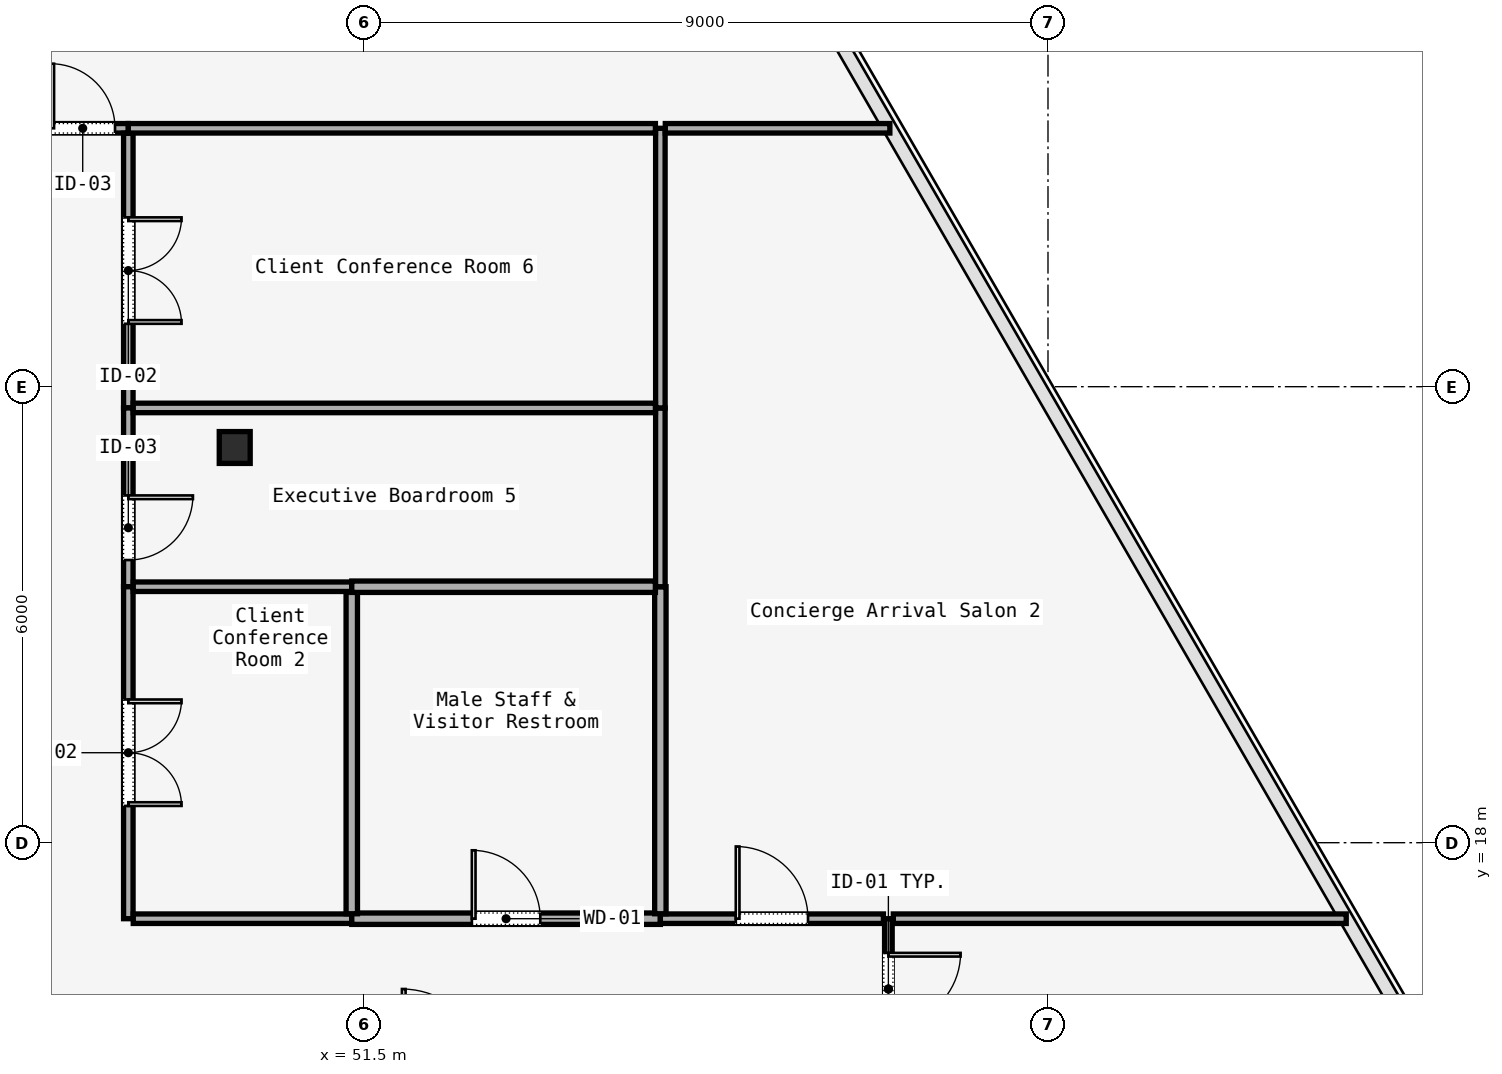
"""IFC4 building model, lengths in metres.
Left out: names, types, materials, properties, quantities, classifications, styles, units other than length and angle.
Written with IfcOpenShell. Run it as: python <this file> out.ifc"""

import sys

from ifc_helpers import new_model, si_unit, direction, frame, frame_2d, origin, origin_2d, place, context, subcontext, project, spatial, rectangle, i_section, extrude, element, fill, save


model = new_model("IFC4")
c1 = context("Model", 3, precision=1e-05, world=origin(), true_north=direction((0.0, 1.0)))
c2 = subcontext(c1, "Body", "Model", "MODEL_VIEW")
j1 = project(units=[si_unit("LENGTHUNIT", "METRE"), si_unit("PLANEANGLEUNIT", "RADIAN")], contexts=[c1])
p1 = place(None, origin())
s1 = spatial("IfcSite", under=j1, at=p1, CompositionType="ELEMENT")
p2 = place(p1, origin())
s2 = spatial("IfcBuilding", under=s1, at=p2, CompositionType="ELEMENT")
p3 = place(p2, frame((0.0, 0.0, 157.4)))
s3 = spatial("IfcBuildingStorey", under=s2, at=p3, CompositionType="ELEMENT", Elevation=157.4)
p4 = place(p3, frame((49.8, 23.2, 0.0), z_axis=(0.0, 0.0, 1.0), x_axis=(1.0, 0.0, 0.0)))
e1 = element("IfcColumn", 1, at=p4, inside=s3, PredefinedType="COLUMN", context=c2, shape_type="SweptSolid", body=[
    extrude(i_section(OverallWidth=0.407, OverallDepth=0.419, WebThickness=0.031, FlangeThickness=0.049, FilletRadius=0.015, at=origin_2d()), origin(), (0.0, 0.0, 1.0), 3.58),
])
p5 = place(p3, frame((58.4, 17.0, 0.0), z_axis=(0.0, 0.0, 1.0), x_axis=(0.0, -1.0, 0.0)))
e2 = element("IfcWall", 2, at=p5, inside=s3, PredefinedType="MOVABLE", context=c2, shape_type="SweptSolid", body=[
    extrude(rectangle(XDim=1.85, YDim=0.1, at=frame_2d((0.925, 0.0))), origin(), (0.0, 0.0, 1.0), 3.01),
])
p6 = place(p5, frame((0.45, 0.0, 0.0)))
e3 = element("IfcOpeningElement", 3, at=p6, cuts=e2, PredefinedType="OPENING", context=c2, shape_type="SweptSolid", body=[
    extrude(rectangle(XDim=0.95, YDim=2.2, at=frame_2d((0.475, 1.1))), frame((0.0, 0.05, 0.0), z_axis=(0.0, -1.0, 0.0), x_axis=(1.0, 0.0, 0.0)), (0.0, 0.0, 1.0), 0.1),
])
p7 = place(p3, frame((47.2, 27.4, 0.0), z_axis=(0.0, 0.0, 1.0), x_axis=(1.0, 0.0, 0.0)))
e4 = element("IfcWall", 4, at=p7, inside=s3, PredefinedType="PARTITIONING", context=c2, shape_type="SweptSolid", body=[
    extrude(rectangle(XDim=1.2, YDim=0.125, at=frame_2d((0.6, 0.0))), origin(), (0.0, 0.0, 1.0), 3.01),
])
p8 = place(p7, frame((0.175, 0.0, 0.0)))
e5 = element("IfcOpeningElement", 5, at=p8, cuts=e4, PredefinedType="OPENING", context=c2, shape_type="SweptSolid", body=[
    extrude(rectangle(XDim=0.85, YDim=2.15, at=frame_2d((0.425, 1.075))), frame((0.0, 0.062, 0.0), z_axis=(0.0, -1.0, 0.0), x_axis=(1.0, 0.0, 0.0)), (0.0, 0.0, 1.0), 0.125),
])
p9 = place(p3, frame((48.4, 27.335, 0.0), z_axis=(0.0, 0.0, 1.0), x_axis=(0.0, -1.0, 0.0)))
e6 = element("IfcWall", 6, at=p9, inside=s3, PredefinedType="PARTITIONING", context=c2, shape_type="SweptSolid", body=[
    extrude(rectangle(XDim=3.615, YDim=0.125, at=frame_2d((1.807, 0.0))), origin(), (0.0, 0.0, 1.0), 3.01),
])
p10 = place(p9, frame((1.107, 0.0, 0.0)))
e7 = element("IfcOpeningElement", 7, at=p10, cuts=e6, PredefinedType="OPENING", context=c2, shape_type="SweptSolid", body=[
    extrude(rectangle(XDim=1.4, YDim=2.2, at=frame_2d((0.7, 1.1))), frame((0.0, 0.062, 0.0), z_axis=(0.0, -1.0, 0.0), x_axis=(1.0, 0.0, 0.0)), (0.0, 0.0, 1.0), 0.125),
])
p11 = place(p3, frame((48.4, 23.72, 0.0), z_axis=(0.0, 0.0, 1.0), x_axis=(0.0, -1.0, 0.0)))
e8 = element("IfcWall", 8, at=p11, inside=s3, PredefinedType="PARTITIONING", context=c2, shape_type="SweptSolid", body=[
    extrude(rectangle(XDim=2.353, YDim=0.125, at=frame_2d((1.176, 0.0))), origin(), (0.0, 0.0, 1.0), 3.01),
])
p12 = place(p11, frame((1.151, 0.0, 0.0)))
e9 = element("IfcOpeningElement", 9, at=p12, cuts=e8, PredefinedType="OPENING", context=c2, shape_type="SweptSolid", body=[
    extrude(rectangle(XDim=0.85, YDim=2.15, at=frame_2d((0.425, 1.075))), frame((0.0, 0.062, 0.0), z_axis=(0.0, -1.0, 0.0), x_axis=(1.0, 0.0, 0.0)), (0.0, 0.0, 1.0), 0.125),
])
p13 = place(p3, frame((48.4, 21.368, 0.0), z_axis=(0.0, 0.0, 1.0), x_axis=(0.0, -1.0, 0.0)))
e10 = element("IfcWall", 10, at=p13, inside=s3, PredefinedType="PARTITIONING", context=c2, shape_type="SweptSolid", body=[
    extrude(rectangle(XDim=4.368, YDim=0.125, at=frame_2d((2.184, 0.0))), origin(), (0.0, 0.0, 1.0), 3.01),
])
p14 = place(p13, frame((1.484, 0.0, 0.0)))
e11 = element("IfcOpeningElement", 11, at=p14, cuts=e10, PredefinedType="OPENING", context=c2, shape_type="SweptSolid", body=[
    extrude(rectangle(XDim=1.4, YDim=2.2, at=frame_2d((0.7, 1.1))), frame((0.0, 0.062, 0.0), z_axis=(0.0, -1.0, 0.0), x_axis=(1.0, 0.0, 0.0)), (0.0, 0.0, 1.0), 0.125),
])
p15 = place(p3, frame((48.465, 17.0, 0.0), z_axis=(0.0, 0.0, 1.0), x_axis=(1.0, 0.0, 0.0)))
e12 = element("IfcWall", 12, at=p15, inside=s3, PredefinedType="PARTITIONING", context=c2, shape_type="SweptSolid", body=[
    extrude(rectangle(XDim=2.875, YDim=0.125, at=frame_2d((1.438, 0.0))), origin(), (0.0, 0.0, 1.0), 3.01),
])
p16 = place(p3, frame((51.34, 17.0, 0.0), z_axis=(0.0, 0.0, 1.0), x_axis=(1.0, 0.0, 0.0)))
e13 = element("IfcWall", 13, at=p16, inside=s3, PredefinedType="PARTITIONING", context=c2, shape_type="SweptSolid", body=[
    extrude(rectangle(XDim=4.06, YDim=0.15, at=frame_2d((2.03, 0.0))), origin(), (0.0, 0.0, 1.0), 3.01),
])
p17 = place(p16, frame((1.58, 0.0, 0.0)))
e14 = element("IfcOpeningElement", 14, at=p17, cuts=e13, PredefinedType="OPENING", context=c2, shape_type="SweptSolid", body=[
    extrude(rectangle(XDim=0.9, YDim=2.15, at=frame_2d((0.45, 1.075))), frame((0.0, 0.075, 0.0), z_axis=(0.0, -1.0, 0.0), x_axis=(1.0, 0.0, 0.0)), (0.0, 0.0, 1.0), 0.15),
])
p18 = place(p3, frame((55.4, 17.0, 0.0), z_axis=(0.0, 0.0, 1.0), x_axis=(1.0, 0.0, 0.0)))
e15 = element("IfcWall", 15, at=p18, inside=s3, PredefinedType="PARTITIONING", context=c2, shape_type="SweptSolid", body=[
    extrude(rectangle(XDim=2.935, YDim=0.125, at=frame_2d((1.468, 0.0))), origin(), (0.0, 0.0, 1.0), 3.01),
])
p19 = place(p18, frame((0.992, 0.0, 0.0)))
e16 = element("IfcOpeningElement", 16, at=p19, cuts=e15, PredefinedType="OPENING", context=c2, shape_type="SweptSolid", body=[
    extrude(rectangle(XDim=0.95, YDim=2.2, at=frame_2d((0.475, 1.1))), frame((0.0, 0.062, 0.0), z_axis=(0.0, -1.0, 0.0), x_axis=(1.0, 0.0, 0.0)), (0.0, 0.0, 1.0), 0.125),
])
p20 = place(p3, frame((58.465, 17.0, 0.0), z_axis=(0.0, 0.0, 1.0), x_axis=(1.0, 0.0, 0.0)))
e17 = element("IfcWall", 17, at=p20, inside=s3, PredefinedType="PARTITIONING", context=c2, shape_type="SweptSolid", body=[
    extrude(rectangle(XDim=5.959, YDim=0.125, at=frame_2d((2.979, 0.0))), origin(), (0.0, 0.0, 1.0), 3.01),
])
p21 = place(p3, frame((48.465, 21.368, 0.0), z_axis=(0.0, 0.0, 1.0), x_axis=(1.0, 0.0, 0.0)))
e18 = element("IfcWall", 18, at=p21, inside=s3, PredefinedType="PARTITIONING", context=c2, shape_type="SweptSolid", body=[
    extrude(rectangle(XDim=2.875, YDim=0.125, at=frame_2d((1.438, 0.0))), origin(), (0.0, 0.0, 1.0), 3.01),
])
p22 = place(p3, frame((51.34, 21.303, 0.0), z_axis=(0.0, 0.0, 1.0), x_axis=(0.0, -1.0, 0.0)))
e19 = element("IfcWall", 19, at=p22, inside=s3, PredefinedType="PARTITIONING", context=c2, shape_type="SweptSolid", body=[
    extrude(rectangle(XDim=4.238, YDim=0.15, at=frame_2d((2.119, 0.0))), origin(), (0.0, 0.0, 1.0), 3.01),
])
p23 = place(p3, frame((55.4, 21.368, 0.0), z_axis=(0.0, 0.0, 1.0), x_axis=(0.0, -1.0, 0.0)))
e20 = element("IfcWall", 20, at=p23, inside=s3, PredefinedType="PARTITIONING", context=c2, shape_type="SweptSolid", body=[
    extrude(rectangle(XDim=4.303, YDim=0.15, at=frame_2d((2.151, 0.0))), origin(), (0.0, 0.0, 1.0), 3.01),
])
p24 = place(p3, frame((51.34, 21.368, 0.0), z_axis=(0.0, 0.0, 1.0), x_axis=(1.0, 0.0, 0.0)))
e21 = element("IfcWall", 21, at=p24, inside=s3, PredefinedType="PARTITIONING", context=c2, shape_type="SweptSolid", body=[
    extrude(rectangle(XDim=3.995, YDim=0.15, at=frame_2d((1.998, 0.0))), origin(), (0.0, 0.0, 1.0), 3.01),
])
p25 = place(p3, frame((55.4, 21.368, 0.0), z_axis=(0.0, 0.0, 1.0), x_axis=(0.0, 1.0, 0.0)))
e22 = element("IfcWall", 22, at=p25, inside=s3, PredefinedType="PARTITIONING", context=c2, shape_type="SweptSolid", body=[
    extrude(rectangle(XDim=2.353, YDim=0.125, at=frame_2d((1.176, 0.0))), origin(), (0.0, 0.0, 1.0), 3.01),
])
p26 = place(p3, frame((55.4, 23.72, 0.0), z_axis=(0.0, 0.0, 1.0), x_axis=(0.0, 1.0, 0.0)))
e23 = element("IfcWall", 23, at=p26, inside=s3, PredefinedType="PARTITIONING", context=c2, shape_type="SweptSolid", body=[
    extrude(rectangle(XDim=3.679, YDim=0.125, at=frame_2d((1.84, 0.0))), origin(), (0.0, 0.0, 1.0), 3.01),
])
p27 = place(p3, frame((55.465, 27.4, 0.0), z_axis=(0.0, 0.0, 1.0), x_axis=(1.0, 0.0, 0.0)))
e24 = element("IfcWall", 24, at=p27, inside=s3, PredefinedType="PARTITIONING", context=c2, shape_type="SweptSolid", body=[
    extrude(rectangle(XDim=2.954, YDim=0.125, at=frame_2d((1.477, 0.0))), origin(), (0.0, 0.0, 1.0), 3.01),
])
p28 = place(p3, frame((48.465, 23.72, 0.0), z_axis=(0.0, 0.0, 1.0), x_axis=(1.0, 0.0, 0.0)))
e25 = element("IfcWall", 25, at=p28, inside=s3, PredefinedType="PARTITIONING", context=c2, shape_type="SweptSolid", body=[
    extrude(rectangle(XDim=6.87, YDim=0.125, at=frame_2d((3.435, 0.0))), origin(), (0.0, 0.0, 1.0), 3.01),
])
p29 = place(p3, frame((48.4, 27.4, 0.0), z_axis=(0.0, 0.0, 1.0), x_axis=(1.0, 0.0, 0.0)))
e26 = element("IfcWall", 26, at=p29, inside=s3, PredefinedType="PARTITIONING", context=c2, shape_type="SweptSolid", body=[
    extrude(rectangle(XDim=6.935, YDim=0.125, at=frame_2d((3.468, 0.0))), origin(), (0.0, 0.0, 1.0), 3.01),
])
p30 = place(p6, origin())
e27 = element("IfcDoor", 27, at=p30, inside=s3, OperationType="SINGLE_SWING_LEFT", PredefinedType="DOOR", context=c2, shape_type="SweptSolid", body=[
    extrude(rectangle(XDim=0.95, YDim=2.2, at=frame_2d((0.475, 1.1))), frame((0.0, 0.025, 0.0), z_axis=(0.0, -1.0, 0.0), x_axis=(1.0, 0.0, 0.0)), (0.0, 0.0, 1.0), 0.05),
])
fill(e3, e27)
p31 = place(p14, origin())
e28 = element("IfcDoor", 28, at=p31, inside=s3, OperationType="SINGLE_SWING_RIGHT", PredefinedType="DOOR", context=c2, shape_type="SweptSolid", body=[
    extrude(rectangle(XDim=1.4, YDim=2.2, at=frame_2d((0.7, 1.1))), frame((0.0, 0.025, 0.0), z_axis=(0.0, -1.0, 0.0), x_axis=(1.0, 0.0, 0.0)), (0.0, 0.0, 1.0), 0.05),
])
fill(e11, e28)
p32 = place(p17, origin())
e29 = element("IfcDoor", 29, at=p32, inside=s3, OperationType="SINGLE_SWING_LEFT", PredefinedType="DOOR", context=c2, shape_type="SweptSolid", body=[
    extrude(rectangle(XDim=0.9, YDim=2.15, at=frame_2d((0.45, 1.075))), frame((0.0, 0.025, 0.0), z_axis=(0.0, -1.0, 0.0), x_axis=(1.0, 0.0, 0.0)), (0.0, 0.0, 1.0), 0.05),
])
fill(e14, e29)
p33 = place(p19, origin())
e30 = element("IfcDoor", 30, at=p33, inside=s3, OperationType="SINGLE_SWING_LEFT", PredefinedType="DOOR", context=c2, shape_type="SweptSolid", body=[
    extrude(rectangle(XDim=0.95, YDim=2.2, at=frame_2d((0.475, 1.1))), frame((0.0, 0.025, 0.0), z_axis=(0.0, -1.0, 0.0), x_axis=(1.0, 0.0, 0.0)), (0.0, 0.0, 1.0), 0.05),
])
fill(e16, e30)
p34 = place(p12, origin())
e31 = element("IfcDoor", 31, at=p34, inside=s3, OperationType="SINGLE_SWING_LEFT", PredefinedType="DOOR", context=c2, shape_type="SweptSolid", body=[
    extrude(rectangle(XDim=0.85, YDim=2.15, at=frame_2d((0.425, 1.075))), frame((0.0, 0.025, 0.0), z_axis=(0.0, -1.0, 0.0), x_axis=(1.0, 0.0, 0.0)), (0.0, 0.0, 1.0), 0.05),
])
fill(e9, e31)
p35 = place(p10, origin())
e32 = element("IfcDoor", 32, at=p35, inside=s3, OperationType="SINGLE_SWING_RIGHT", PredefinedType="DOOR", context=c2, shape_type="SweptSolid", body=[
    extrude(rectangle(XDim=1.4, YDim=2.2, at=frame_2d((0.7, 1.1))), frame((0.0, 0.025, 0.0), z_axis=(0.0, -1.0, 0.0), x_axis=(1.0, 0.0, 0.0)), (0.0, 0.0, 1.0), 0.05),
])
fill(e7, e32)
p36 = place(p8, origin())
e33 = element("IfcDoor", 33, at=p36, inside=s3, OperationType="SINGLE_SWING_LEFT", PredefinedType="DOOR", context=c2, shape_type="SweptSolid", body=[
    extrude(rectangle(XDim=0.85, YDim=2.15, at=frame_2d((0.425, 1.075))), frame((0.0, 0.025, 0.0), z_axis=(0.0, -1.0, 0.0), x_axis=(1.0, 0.0, 0.0)), (0.0, 0.0, 1.0), 0.05),
])
fill(e5, e33)
save(model, sys.argv[1])
